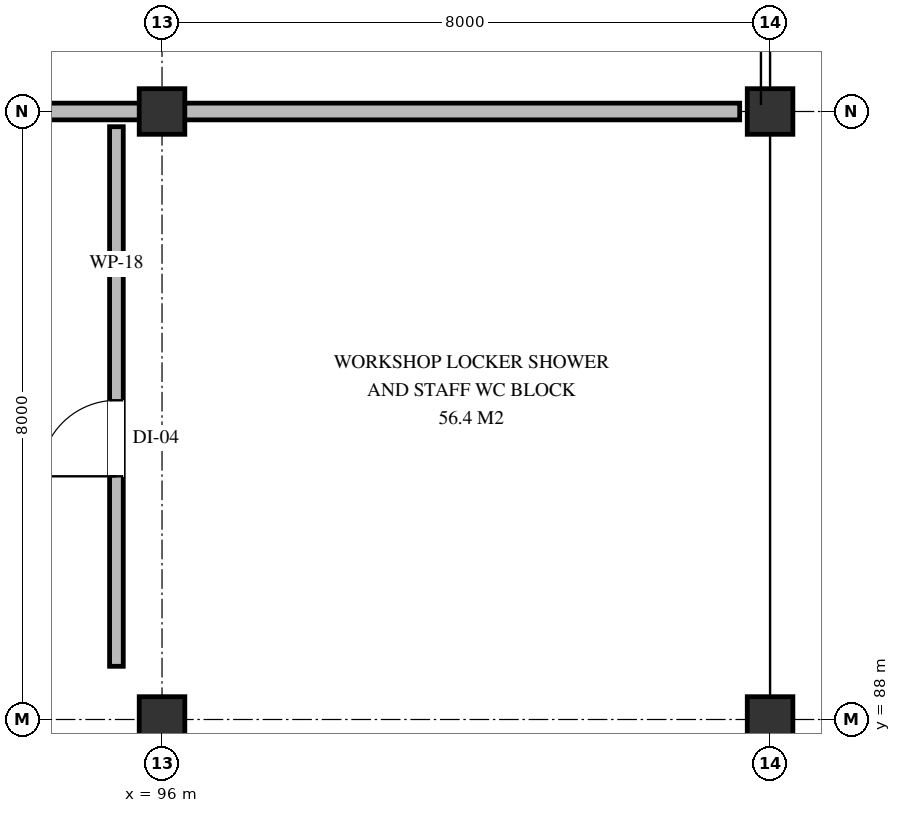
"""IFC4 building model, lengths in metres.
Left out: names, types, materials, properties, quantities, classifications, styles, units other than length and angle.
Written with IfcOpenShell. Run it as: python <this file> out.ifc"""

import sys

from ifc_helpers import new_model, si_unit, direction, frame, frame_2d, origin, origin_2d, place, context, subcontext, project, spatial, rectangle, extrude, element, fill, save


model = new_model("IFC4")
c1 = context("Model", 3, precision=1e-05, world=origin(), true_north=direction((0.0, 1.0)))
c2 = subcontext(c1, "Body", "Model", "MODEL_VIEW")
j1 = project(units=[si_unit("LENGTHUNIT", "METRE"), si_unit("PLANEANGLEUNIT", "RADIAN")], contexts=[c1])
p1 = place(None, origin())
s1 = spatial("IfcSite", under=j1, at=p1, CompositionType="ELEMENT")
p2 = place(p1, origin())
s2 = spatial("IfcBuilding", under=s1, at=p2, CompositionType="ELEMENT")
p3 = place(p2, origin())
s3 = spatial("IfcBuildingStorey", under=s2, at=p3, CompositionType="ELEMENT", Elevation=0.0)
for number, where, z_axis, x_axis in (
    (1, (96.0, 88.0, 0.0), (0.0, 0.0, 1.0), (1.0, 0.0, 0.0)),
    (2, (96.0, 96.0, 0.0), (0.0, 0.0, 1.0), (1.0, 0.0, 0.0)),
    (3, (104.0, 88.0, 0.0), (0.0, 0.0, 1.0), (1.0, 0.0, 0.0)),
    (4, (104.0, 96.0, 0.0), (0.0, 0.0, 1.0), (1.0, 0.0, 0.0)),
):
    element("IfcColumn", number, at=place(p3, frame(where, z_axis=z_axis, x_axis=x_axis)), inside=s3, PredefinedType="COLUMN", context=c2, shape_type="SweptSolid", body=[
        extrude(rectangle(XDim=0.6, YDim=0.6, at=origin_2d()), origin(), (0.0, 0.0, 1.0), 4.8),
    ])
p4 = place(p3, frame((72.4, 96.0, 0.0), z_axis=(0.0, 0.0, 1.0), x_axis=(1.0, 0.0, 0.0)))
e5 = element("IfcWall", 5, at=p4, inside=s3, PredefinedType="PARTITIONING", context=c2, shape_type="SweptSolid", body=[
    extrude(rectangle(XDim=31.2, YDim=0.22, at=frame_2d((15.6, 0.0))), origin(), (0.0, 0.0, 1.0), 3.042),
])
p5 = place(p4, frame((4.3, 0.0, 0.0)))
e6 = element("IfcOpeningElement", 6, at=p5, cuts=e5, PredefinedType="OPENING", context=c2, shape_type="SweptSolid", body=[
    extrude(rectangle(XDim=2.2, YDim=2.6, at=frame_2d((1.1, 1.3))), frame((0.0, 0.12, 0.0), z_axis=(0.0, -1.0, 0.0), x_axis=(1.0, 0.0, 0.0)), (0.0, 0.0, 1.0), 0.24),
])
p6 = place(p4, frame((18.5, 0.0, 0.0)))
e7 = element("IfcOpeningElement", 7, at=p6, cuts=e5, PredefinedType="OPENING", context=c2, shape_type="SweptSolid", body=[
    extrude(rectangle(XDim=1.1, YDim=2.2, at=frame_2d((0.55, 1.1))), frame((0.0, 0.12, 0.0), z_axis=(0.0, -1.0, 0.0), x_axis=(1.0, 0.0, 0.0)), (0.0, 0.0, 1.0), 0.24),
])
p7 = place(p3, frame((95.4, 88.7, 0.0), z_axis=(0.0, 0.0, 1.0), x_axis=(0.0, 1.0, 0.0)))
e8 = element("IfcWall", 8, at=p7, inside=s3, PredefinedType="PARTITIONING", context=c2, shape_type="SweptSolid", body=[
    extrude(rectangle(XDim=7.1, YDim=0.18, at=frame_2d((3.55, 0.0))), origin(), (0.0, 0.0, 1.0), 3.042),
])
p8 = place(p7, frame((2.5, 0.0, 0.0)))
e9 = element("IfcOpeningElement", 9, at=p8, cuts=e8, PredefinedType="OPENING", context=c2, shape_type="SweptSolid", body=[
    extrude(rectangle(XDim=1.0, YDim=2.1, at=frame_2d((0.5, 1.05))), frame((0.0, 0.1, 0.0), z_axis=(0.0, -1.0, 0.0), x_axis=(1.0, 0.0, 0.0)), (0.0, 0.0, 1.0), 0.2),
])
p9 = place(p8, origin())
e10 = element("IfcDoor", 10, at=p9, inside=s3, OperationType="SINGLE_SWING_LEFT", PredefinedType="DOOR", context=c2, shape_type="SweptSolid", body=[
    extrude(rectangle(XDim=1.0, YDim=2.1, at=frame_2d((0.5, 1.05))), frame((0.0, 0.025, 0.0), z_axis=(0.0, -1.0, 0.0), x_axis=(1.0, 0.0, 0.0)), (0.0, 0.0, 1.0), 0.05),
])
fill(e9, e10)
save(model, sys.argv[1])
